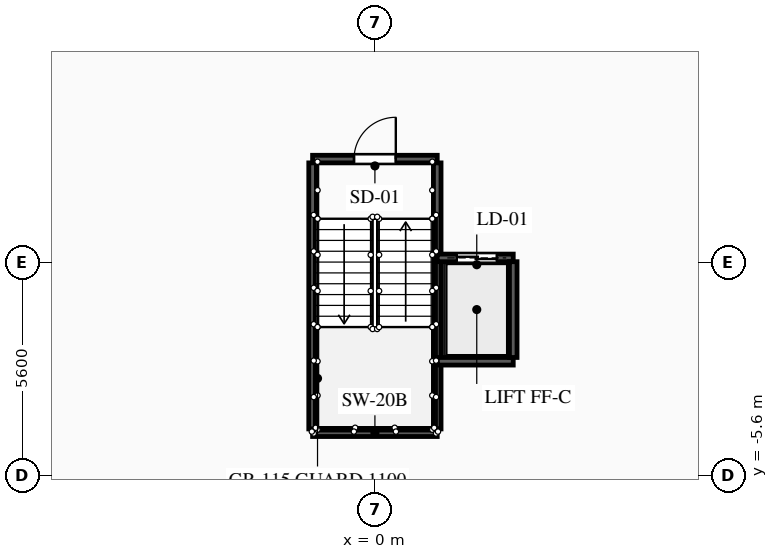
"""IFC4 building model, lengths in metres.
Left out: names, types, materials, properties, quantities, classifications, styles, units other than length and angle.
Written with IfcOpenShell. Run it as: python <this file> out.ifc"""

import sys

from ifc_helpers import new_model, si_unit, direction, frame, frame_2d, origin, place, context, subcontext, project, spatial, rectangle, extrude, element, fill, save


model = new_model("IFC4")
c1 = context("Model", 3, precision=1e-05, world=origin(), true_north=direction((0.0, 1.0)))
c2 = subcontext(c1, "Body", "Model", "MODEL_VIEW")
j1 = project(units=[si_unit("LENGTHUNIT", "METRE"), si_unit("PLANEANGLEUNIT", "RADIAN")], contexts=[c1])
p1 = place(None, origin())
s1 = spatial("IfcSite", under=j1, at=p1, CompositionType="ELEMENT")
p2 = place(p1, origin())
s2 = spatial("IfcBuilding", under=s1, at=p2, CompositionType="ELEMENT")
p3 = place(p2, frame((0.0, 0.0, 270.2)))
s3 = spatial("IfcBuildingStorey", under=s2, at=p3, CompositionType="ELEMENT", Elevation=270.2)
p4 = place(p3, frame((-1.64, 2.72, 0.0), z_axis=(0.0, 0.0, 1.0), x_axis=(1.0, 0.0, 0.0)))
e1 = element("IfcWall", 1, at=p4, inside=s3, PredefinedType="SHEAR", context=c2, shape_type="SweptSolid", body=[
    extrude(rectangle(XDim=3.28, YDim=0.2, at=frame_2d((1.64, 0.0))), origin(), (0.0, 0.0, 1.0), 3.4),
])
p5 = place(p4, frame((1.09, 0.0, 0.0)))
e2 = element("IfcOpeningElement", 2, at=p5, cuts=e1, PredefinedType="OPENING", context=c2, shape_type="SweptSolid", body=[
    extrude(rectangle(XDim=1.1, YDim=2.15, at=frame_2d((0.55, 1.075))), frame((0.0, 0.11, 0.0), z_axis=(0.0, -1.0, 0.0), x_axis=(1.0, 0.0, 0.0)), (0.0, 0.0, 1.0), 0.22),
])
p6 = place(p3, frame((-1.64, -4.48, 0.0), z_axis=(0.0, 0.0, 1.0), x_axis=(1.0, 0.0, 0.0)))
e3 = element("IfcWall", 3, at=p6, inside=s3, PredefinedType="SHEAR", context=c2, shape_type="SweptSolid", body=[
    extrude(rectangle(XDim=3.28, YDim=0.2, at=frame_2d((1.64, 0.0))), origin(), (0.0, 0.0, 1.0), 3.4),
])
for number, where, z_axis, x_axis in (
    (4, (-1.64, -4.38, 0.0), (0.0, 0.0, 1.0), (0.0, 1.0, 0.0)),
    (5, (1.64, -4.38, 0.0), (0.0, 0.0, 1.0), (0.0, 1.0, 0.0)),
):
    element("IfcWall", number, at=place(p3, frame(where, z_axis=z_axis, x_axis=x_axis)), inside=s3, PredefinedType="SHEAR", context=c2, shape_type="SweptSolid", body=[
        extrude(rectangle(XDim=7.0, YDim=0.2, at=frame_2d((3.5, 0.0))), origin(), (0.0, 0.0, 1.0), 3.4),
    ])
p7 = place(p3, frame((1.64, 0.12, 0.0), z_axis=(0.0, 0.0, 1.0), x_axis=(1.0, 0.0, 0.0)))
e6 = element("IfcWall", 6, at=p7, inside=s3, PredefinedType="SHEAR", context=c2, shape_type="SweptSolid", body=[
    extrude(rectangle(XDim=2.0, YDim=0.2, at=frame_2d((1.0, 0.0))), origin(), (0.0, 0.0, 1.0), 3.4),
])
p8 = place(p7, frame((0.515, 0.0, 0.0)))
e7 = element("IfcOpeningElement", 7, at=p8, cuts=e6, PredefinedType="OPENING", context=c2, shape_type="SweptSolid", body=[
    extrude(rectangle(XDim=1.05, YDim=2.1, at=frame_2d((0.525, 1.05))), frame((0.0, 0.11, 0.0), z_axis=(0.0, -1.0, 0.0), x_axis=(1.0, 0.0, 0.0)), (0.0, 0.0, 1.0), 0.22),
])
p9 = place(p3, frame((1.64, -2.6, 0.0), z_axis=(0.0, 0.0, 1.0), x_axis=(1.0, 0.0, 0.0)))
e8 = element("IfcWall", 8, at=p9, inside=s3, PredefinedType="SHEAR", context=c2, shape_type="SweptSolid", body=[
    extrude(rectangle(XDim=2.0, YDim=0.2, at=frame_2d((1.0, 0.0))), origin(), (0.0, 0.0, 1.0), 3.4),
])
p10 = place(p3, frame((3.64, -2.5, 0.0), z_axis=(0.0, 0.0, 1.0), x_axis=(0.0, 1.0, 0.0)))
e9 = element("IfcWall", 9, at=p10, inside=s3, PredefinedType="SHEAR", context=c2, shape_type="SweptSolid", body=[
    extrude(rectangle(XDim=2.52, YDim=0.2, at=frame_2d((1.26, 0.0))), origin(), (0.0, 0.0, 1.0), 3.4),
])
p11 = place(p5, origin())
e10 = element("IfcDoor", 10, at=p11, inside=s3, OperationType="SINGLE_SWING_RIGHT", PredefinedType="DOOR", context=c2, shape_type="SweptSolid", body=[
    extrude(rectangle(XDim=1.1, YDim=2.15, at=frame_2d((0.55, 1.075))), frame((0.0, 0.025, 0.0), z_axis=(0.0, -1.0, 0.0), x_axis=(1.0, 0.0, 0.0)), (0.0, 0.0, 1.0), 0.05),
])
fill(e2, e10)
p12 = place(p8, origin())
e11 = element("IfcDoor", 11, at=p12, inside=s3, OperationType="DOUBLE_DOOR_SLIDING", PredefinedType="DOOR", context=c2, shape_type="SweptSolid", body=[
    extrude(rectangle(XDim=1.05, YDim=2.1, at=frame_2d((0.525, 1.05))), frame((0.0, 0.025, 0.0), z_axis=(0.0, -1.0, 0.0), x_axis=(1.0, 0.0, 0.0)), (0.0, 0.0, 1.0), 0.05),
])
fill(e7, e11)
save(model, sys.argv[1])
